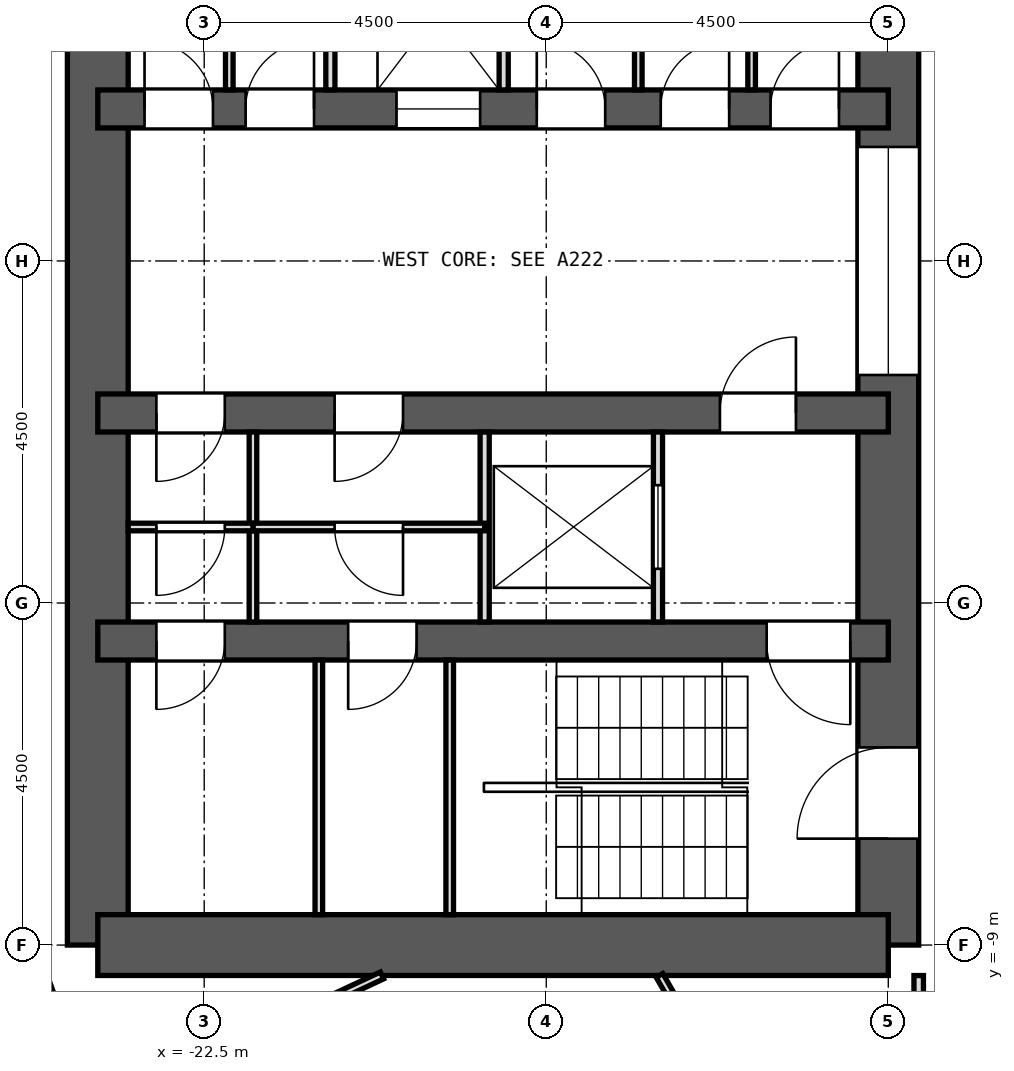
"""IFC4 building model, lengths in metres.
Left out: names, types, materials, properties, quantities, classifications, styles, units other than length and angle.
Written with IfcOpenShell. Run it as: python <this file> out.ifc"""

import sys

from ifc_helpers import new_model, si_unit, direction, frame, frame_2d, origin, place, context, subcontext, project, spatial, rectangle, extrude, element, fill, save


model = new_model("IFC4")
c1 = context("Model", 3, precision=1e-05, world=origin(), true_north=direction((0.0, 1.0)))
c2 = subcontext(c1, "Body", "Model", "MODEL_VIEW")
j1 = project(units=[si_unit("LENGTHUNIT", "METRE"), si_unit("PLANEANGLEUNIT", "RADIAN")], contexts=[c1])
p1 = place(None, origin())
s1 = spatial("IfcSite", under=j1, at=p1, CompositionType="ELEMENT")
p2 = place(p1, origin())
s2 = spatial("IfcBuilding", under=s1, at=p2, CompositionType="ELEMENT")
p3 = place(p2, frame((0.0, 0.0, 141.4)))
s3 = spatial("IfcBuildingStorey", under=s2, at=p3, CompositionType="ELEMENT", Elevation=141.4)
p4 = place(p3, frame((-13.5, -9.0, 0.0), z_axis=(0.0, 0.0, 1.0), x_axis=(0.0, 1.0, 0.0)))
e1 = element("IfcWall", 1, at=p4, inside=s3, PredefinedType="SHEAR", context=c2, shape_type="SweptSolid", body=[
    extrude(rectangle(XDim=18.0, YDim=0.8, at=frame_2d((9.0, 0.0))), origin(), (0.0, 0.0, 1.0), 3.3),
])
p5 = place(p4, frame((15.4, 0.0, 0.0)))
e2 = element("IfcOpeningElement", 2, at=p5, cuts=e1, PredefinedType="OPENING", context=c2, shape_type="SweptSolid", body=[
    extrude(rectangle(XDim=1.2, YDim=2.1, at=frame_2d((0.6, 1.05))), frame((0.0, 0.412, 0.0), z_axis=(0.0, -1.0, 0.0), x_axis=(1.0, 0.0, 0.0)), (0.0, 0.0, 1.0), 0.824),
])
p6 = place(p4, frame((1.4, 0.0, 0.0)))
e3 = element("IfcOpeningElement", 3, at=p6, cuts=e1, PredefinedType="OPENING", context=c2, shape_type="SweptSolid", body=[
    extrude(rectangle(XDim=1.2, YDim=2.1, at=frame_2d((0.6, 1.05))), frame((0.0, 0.412, 0.0), z_axis=(0.0, -1.0, 0.0), x_axis=(1.0, 0.0, 0.0)), (0.0, 0.0, 1.0), 0.824),
])
p7 = place(p4, frame((7.5, 0.0, 0.0)))
e4 = element("IfcOpeningElement", 4, at=p7, cuts=e1, PredefinedType="OPENING", context=c2, shape_type="SweptSolid", body=[
    extrude(rectangle(XDim=3.0, YDim=2.4, at=frame_2d((1.5, 1.2))), frame((0.0, 0.412, 0.0), z_axis=(0.0, -1.0, 0.0), x_axis=(1.0, 0.0, 0.0)), (0.0, 0.0, 1.0), 0.824),
])
p8 = place(p3, frame((-23.9, -9.0, 0.0), z_axis=(0.0, 0.0, 1.0), x_axis=(0.0, 1.0, 0.0)))
e5 = element("IfcWall", 5, at=p8, inside=s3, PredefinedType="SHEAR", context=c2, shape_type="SweptSolid", body=[
    extrude(rectangle(XDim=18.0, YDim=0.8, at=frame_2d((9.0, 0.0))), origin(), (0.0, 0.0, 1.0), 3.3),
])
p9 = place(p3, frame((-13.5, -9.0, 0.0), z_axis=(0.0, 0.0, 1.0), x_axis=(-1.0, 0.0, 0.0)))
e6 = element("IfcWall", 6, at=p9, inside=s3, PredefinedType="SHEAR", context=c2, shape_type="SweptSolid", body=[
    extrude(rectangle(XDim=10.4, YDim=0.8, at=frame_2d((5.2, 0.0))), origin(), (0.0, 0.0, 1.0), 3.3),
])
p10 = place(p3, frame((-13.5, -5.0, 0.0), z_axis=(0.0, 0.0, 1.0), x_axis=(-1.0, 0.0, 0.0)))
e7 = element("IfcWall", 7, at=p10, inside=s3, PredefinedType="SHEAR", context=c2, shape_type="SweptSolid", body=[
    extrude(rectangle(XDim=10.4, YDim=0.5, at=frame_2d((5.2, 0.0))), origin(), (0.0, 0.0, 1.0), 3.3),
])
p11 = place(p10, frame((6.206, 0.0, 0.0)))
e8 = element("IfcOpeningElement", 8, at=p11, cuts=e7, PredefinedType="OPENING", context=c2, shape_type="SweptSolid", body=[
    extrude(rectangle(XDim=0.9, YDim=2.1, at=frame_2d((0.45, 1.05))), frame((0.0, 0.262, 0.0), z_axis=(0.0, -1.0, 0.0), x_axis=(1.0, 0.0, 0.0)), (0.0, 0.0, 1.0), 0.524),
])
p12 = place(p10, frame((8.729, 0.0, 0.0)))
e9 = element("IfcOpeningElement", 9, at=p12, cuts=e7, PredefinedType="OPENING", context=c2, shape_type="SweptSolid", body=[
    extrude(rectangle(XDim=0.9, YDim=2.1, at=frame_2d((0.45, 1.05))), frame((0.0, 0.262, 0.0), z_axis=(0.0, -1.0, 0.0), x_axis=(1.0, 0.0, 0.0)), (0.0, 0.0, 1.0), 0.524),
])
p13 = place(p10, frame((0.5, 0.0, 0.0)))
e10 = element("IfcOpeningElement", 10, at=p13, cuts=e7, PredefinedType="OPENING", context=c2, shape_type="SweptSolid", body=[
    extrude(rectangle(XDim=1.1, YDim=2.1, at=frame_2d((0.55, 1.05))), frame((0.0, 0.262, 0.0), z_axis=(0.0, -1.0, 0.0), x_axis=(1.0, 0.0, 0.0)), (0.0, 0.0, 1.0), 0.524),
])
p14 = place(p3, frame((-13.5, 2.0, 0.0), z_axis=(0.0, 0.0, 1.0), x_axis=(-1.0, 0.0, 0.0)))
e11 = element("IfcWall", 11, at=p14, inside=s3, PredefinedType="SHEAR", context=c2, shape_type="SweptSolid", body=[
    extrude(rectangle(XDim=10.4, YDim=0.5, at=frame_2d((5.2, 0.0))), origin(), (0.0, 0.0, 1.0), 3.3),
])
p15 = place(p14, frame((5.37, 0.0, 0.0)))
e12 = element("IfcOpeningElement", 12, at=p15, cuts=e11, PredefinedType="OPENING", context=c2, shape_type="SweptSolid", body=[
    extrude(rectangle(XDim=1.1, YDim=2.1, at=frame_2d((0.55, 1.05))), frame((0.0, 0.262, 0.0), z_axis=(0.0, -1.0, 0.0), x_axis=(1.0, 0.0, 0.0)), (0.0, 0.0, 1.0), 0.524),
])
p16 = place(p14, frame((0.649, 0.0, 0.0)))
e13 = element("IfcOpeningElement", 13, at=p16, cuts=e11, PredefinedType="OPENING", context=c2, shape_type="SweptSolid", body=[
    extrude(rectangle(XDim=0.9, YDim=2.1, at=frame_2d((0.45, 1.05))), frame((0.0, 0.262, 0.0), z_axis=(0.0, -1.0, 0.0), x_axis=(1.0, 0.0, 0.0)), (0.0, 0.0, 1.0), 0.524),
])
p17 = place(p14, frame((2.094, 0.0, 0.0)))
e14 = element("IfcOpeningElement", 14, at=p17, cuts=e11, PredefinedType="OPENING", context=c2, shape_type="SweptSolid", body=[
    extrude(rectangle(XDim=0.9, YDim=2.1, at=frame_2d((0.45, 1.05))), frame((0.0, 0.262, 0.0), z_axis=(0.0, -1.0, 0.0), x_axis=(1.0, 0.0, 0.0)), (0.0, 0.0, 1.0), 0.524),
])
p18 = place(p14, frame((3.725, 0.0, 0.0)))
e15 = element("IfcOpeningElement", 15, at=p18, cuts=e11, PredefinedType="OPENING", context=c2, shape_type="SweptSolid", body=[
    extrude(rectangle(XDim=0.9, YDim=2.1, at=frame_2d((0.45, 1.05))), frame((0.0, 0.262, 0.0), z_axis=(0.0, -1.0, 0.0), x_axis=(1.0, 0.0, 0.0)), (0.0, 0.0, 1.0), 0.524),
])
p19 = place(p14, frame((7.555, 0.0, 0.0)))
e16 = element("IfcOpeningElement", 16, at=p19, cuts=e11, PredefinedType="OPENING", context=c2, shape_type="SweptSolid", body=[
    extrude(rectangle(XDim=0.9, YDim=2.1, at=frame_2d((0.45, 1.05))), frame((0.0, 0.262, 0.0), z_axis=(0.0, -1.0, 0.0), x_axis=(1.0, 0.0, 0.0)), (0.0, 0.0, 1.0), 0.524),
])
p20 = place(p14, frame((8.885, 0.0, 0.0)))
e17 = element("IfcOpeningElement", 17, at=p20, cuts=e11, PredefinedType="OPENING", context=c2, shape_type="SweptSolid", body=[
    extrude(rectangle(XDim=0.9, YDim=2.1, at=frame_2d((0.45, 1.05))), frame((0.0, 0.262, 0.0), z_axis=(0.0, -1.0, 0.0), x_axis=(1.0, 0.0, 0.0)), (0.0, 0.0, 1.0), 0.524),
])
p21 = place(p3, frame((-13.5, -2.0, 0.0), z_axis=(0.0, 0.0, 1.0), x_axis=(-1.0, 0.0, 0.0)))
e18 = element("IfcWall", 18, at=p21, inside=s3, PredefinedType="SHEAR", context=c2, shape_type="SweptSolid", body=[
    extrude(rectangle(XDim=10.4, YDim=0.5, at=frame_2d((5.2, 0.0))), origin(), (0.0, 0.0, 1.0), 3.3),
])
p22 = place(p21, frame((1.215, 0.0, 0.0)))
e19 = element("IfcOpeningElement", 19, at=p22, cuts=e18, PredefinedType="OPENING", context=c2, shape_type="SweptSolid", body=[
    extrude(rectangle(XDim=1.0, YDim=2.1, at=frame_2d((0.5, 1.05))), frame((0.0, 0.262, 0.0), z_axis=(0.0, -1.0, 0.0), x_axis=(1.0, 0.0, 0.0)), (0.0, 0.0, 1.0), 0.524),
])
p23 = place(p21, frame((6.384, 0.0, 0.0)))
e20 = element("IfcOpeningElement", 20, at=p23, cuts=e18, PredefinedType="OPENING", context=c2, shape_type="SweptSolid", body=[
    extrude(rectangle(XDim=0.9, YDim=2.1, at=frame_2d((0.45, 1.05))), frame((0.0, 0.262, 0.0), z_axis=(0.0, -1.0, 0.0), x_axis=(1.0, 0.0, 0.0)), (0.0, 0.0, 1.0), 0.524),
])
p24 = place(p21, frame((8.729, 0.0, 0.0)))
e21 = element("IfcOpeningElement", 21, at=p24, cuts=e18, PredefinedType="OPENING", context=c2, shape_type="SweptSolid", body=[
    extrude(rectangle(XDim=0.9, YDim=2.1, at=frame_2d((0.45, 1.05))), frame((0.0, 0.262, 0.0), z_axis=(0.0, -1.0, 0.0), x_axis=(1.0, 0.0, 0.0)), (0.0, 0.0, 1.0), 0.524),
])
p25 = place(p3, frame((-25.617, -7.383, 0.0), z_axis=(0.0, 0.0, 1.0), x_axis=(0.341990236633, -0.939703505393, 0.0)))
e22 = element("IfcWall", 22, at=p25, inside=s3, PredefinedType="SOLIDWALL", context=c2, shape_type="SweptSolid", body=[
    extrude(rectangle(XDim=3.648, YDim=0.6, at=frame_2d((1.824, 0.0))), origin(), (0.0, 0.0, 1.0), 2.8),
])
p26 = place(p3, frame((-16.51, -9.4, 0.0), z_axis=(0.0, 0.0, 1.0), x_axis=(0.499745582535, -0.866172241957, 0.0)))
e23 = element("IfcWall", 23, at=p26, inside=s3, PredefinedType="PARTITIONING", context=c2, shape_type="SweptSolid", body=[
    extrude(rectangle(XDim=1.828, YDim=0.1, at=frame_2d((0.914, 0.0))), origin(), (0.0, 0.0, 1.0), 2.8),
])
p27 = place(p26, frame((0.763, 0.0, 0.0)))
e24 = element("IfcOpeningElement", 24, at=p27, cuts=e23, PredefinedType="OPENING", context=c2, shape_type="SweptSolid", body=[
    extrude(rectangle(XDim=0.85, YDim=2.1, at=frame_2d((0.425, 1.05))), frame((0.0, 0.062, 0.0), z_axis=(0.0, -1.0, 0.0), x_axis=(1.0, 0.0, 0.0)), (0.0, 0.0, 1.0), 0.124),
])
p28 = place(p3, frame((-23.26, -10.847, 0.0), z_axis=(0.0, 0.0, 1.0), x_axis=(0.906042683175, 0.423186313892, 0.0)))
e25 = element("IfcWall", 25, at=p28, inside=s3, PredefinedType="PARTITIONING", context=c2, shape_type="SweptSolid", body=[
    extrude(rectangle(XDim=3.42, YDim=0.1, at=frame_2d((1.71, 0.0))), origin(), (0.0, 0.0, 1.0), 2.8),
])
p29 = place(p3, frame((-13.097, -13.096, 0.0), z_axis=(0.0, 0.0, 1.0), x_axis=(0.707375421738, 0.706838038536, 0.0)))
e26 = element("IfcWall", 26, at=p29, inside=s3, PredefinedType="PARTITIONING", context=c2, shape_type="SweptSolid", body=[
    extrude(rectangle(XDim=6.815, YDim=0.125, at=frame_2d((3.407, 0.0))), origin(), (0.0, 0.0, 1.0), 2.8),
])
p30 = place(p3, frame((-13.1, -13.032, 0.0), z_axis=(0.0, 0.0, 1.0), x_axis=(0.0, 1.0, 0.0)))
e27 = element("IfcWall", 27, at=p30, inside=s3, PredefinedType="PARTITIONING", context=c2, shape_type="SweptSolid", body=[
    extrude(rectangle(XDim=3.632, YDim=0.125, at=frame_2d((1.816, 0.0))), origin(), (0.0, 0.0, 1.0), 2.8),
])
for number, where, z_axis, x_axis in (
    (28, (-15.298, 2.25, 0.0), (0.0, 0.0, 1.0), (0.0, 1.0, 0.0)),
    (29, (-16.789, 2.25, 0.0), (0.0, 0.0, 1.0), (0.0, 1.0, 0.0)),
):
    element("IfcWall", number, at=place(p3, frame(where, z_axis=z_axis, x_axis=x_axis)), inside=s3, PredefinedType="PARTITIONING", context=c2, shape_type="SweptSolid", body=[
        extrude(rectangle(XDim=2.5, YDim=0.1, at=frame_2d((1.25, 0.0))), origin(), (0.0, 0.0, 1.0), 2.8),
    ])
for number, where, z_axis, x_axis in (
    (30, (-18.56, 2.25, 0.0), (0.0, 0.0, 1.0), (0.0, 1.0, 0.0)),
    (31, (-20.84, 2.25, 0.0), (0.0, 0.0, 1.0), (0.0, 1.0, 0.0)),
):
    element("IfcWall", number, at=place(p3, frame(where, z_axis=z_axis, x_axis=x_axis)), inside=s3, PredefinedType="PARTITIONING", context=c2, shape_type="SweptSolid", body=[
        extrude(rectangle(XDim=2.5, YDim=0.12, at=frame_2d((1.25, 0.0))), origin(), (0.0, 0.0, 1.0), 2.8),
    ])
p31 = place(p3, frame((-22.17, 2.25, 0.0), z_axis=(0.0, 0.0, 1.0), x_axis=(0.0, 1.0, 0.0)))
e32 = element("IfcWall", 32, at=p31, inside=s3, PredefinedType="PARTITIONING", context=c2, shape_type="SweptSolid", body=[
    extrude(rectangle(XDim=2.5, YDim=0.1, at=frame_2d((1.25, 0.0))), origin(), (0.0, 0.0, 1.0), 2.8),
])
p32 = place(p3, frame((-16.53, -4.75, 0.0), z_axis=(0.0, 0.0, 1.0), x_axis=(0.0, 1.0, 0.0)))
e33 = element("IfcWall", 33, at=p32, inside=s3, PredefinedType="PARTITIONING", context=c2, shape_type="SweptSolid", body=[
    extrude(rectangle(XDim=2.5, YDim=0.12, at=frame_2d((1.25, 0.0))), origin(), (0.0, 0.0, 1.0), 2.8),
])
p33 = place(p32, frame((0.7, 0.0, 0.0)))
e34 = element("IfcOpeningElement", 34, at=p33, cuts=e33, PredefinedType="OPENING", context=c2, shape_type="SweptSolid", body=[
    extrude(rectangle(XDim=1.1, YDim=2.1, at=frame_2d((0.55, 1.05))), frame((0.0, 0.072, 0.0), z_axis=(0.0, -1.0, 0.0), x_axis=(1.0, 0.0, 0.0)), (0.0, 0.0, 1.0), 0.144),
])
p34 = place(p3, frame((-18.81, -4.75, 0.0), z_axis=(0.0, 0.0, 1.0), x_axis=(0.0, 1.0, 0.0)))
e35 = element("IfcWall", 35, at=p34, inside=s3, PredefinedType="PARTITIONING", context=c2, shape_type="SweptSolid", body=[
    extrude(rectangle(XDim=2.5, YDim=0.12, at=frame_2d((1.25, 0.0))), origin(), (0.0, 0.0, 1.0), 2.8),
])
p35 = place(p3, frame((-21.858, -4.75, 0.0), z_axis=(0.0, 0.0, 1.0), x_axis=(0.0, 1.0, 0.0)))
e36 = element("IfcWall", 36, at=p35, inside=s3, PredefinedType="PARTITIONING", context=c2, shape_type="SweptSolid", body=[
    extrude(rectangle(XDim=2.5, YDim=0.1, at=frame_2d((1.25, 0.0))), origin(), (0.0, 0.0, 1.0), 2.8),
])
p36 = place(p3, frame((-18.81, -3.5, 0.0), z_axis=(0.0, 0.0, 1.0), x_axis=(-1.0, 0.0, 0.0)))
e37 = element("IfcWall", 37, at=p36, inside=s3, PredefinedType="PARTITIONING", context=c2, shape_type="SweptSolid", body=[
    extrude(rectangle(XDim=3.048, YDim=0.1, at=frame_2d((1.524, 0.0))), origin(), (0.0, 0.0, 1.0), 2.8),
])
p37 = place(p36, frame((1.074, 0.0, 0.0)))
e38 = element("IfcOpeningElement", 38, at=p37, cuts=e37, PredefinedType="OPENING", context=c2, shape_type="SweptSolid", body=[
    extrude(rectangle(XDim=0.9, YDim=2.1, at=frame_2d((0.45, 1.05))), frame((0.0, 0.062, 0.0), z_axis=(0.0, -1.0, 0.0), x_axis=(1.0, 0.0, 0.0)), (0.0, 0.0, 1.0), 0.124),
])
p38 = place(p3, frame((-21.858, -3.5, 0.0), z_axis=(0.0, 0.0, 1.0), x_axis=(-1.0, 0.0, 0.0)))
e39 = element("IfcWall", 39, at=p38, inside=s3, PredefinedType="PARTITIONING", context=c2, shape_type="SweptSolid", body=[
    extrude(rectangle(XDim=1.642, YDim=0.1, at=frame_2d((0.821, 0.0))), origin(), (0.0, 0.0, 1.0), 2.8),
])
p39 = place(p38, frame((0.371, 0.0, 0.0)))
e40 = element("IfcOpeningElement", 40, at=p39, cuts=e39, PredefinedType="OPENING", context=c2, shape_type="SweptSolid", body=[
    extrude(rectangle(XDim=0.9, YDim=2.1, at=frame_2d((0.45, 1.05))), frame((0.0, 0.062, 0.0), z_axis=(0.0, -1.0, 0.0), x_axis=(1.0, 0.0, 0.0)), (0.0, 0.0, 1.0), 0.124),
])
for number, where, z_axis, x_axis in (
    (41, (-19.27, -8.6, 0.0), (0.0, 0.0, 1.0), (0.0, 1.0, 0.0)),
    (42, (-20.992, -8.6, 0.0), (0.0, 0.0, 1.0), (0.0, 1.0, 0.0)),
):
    element("IfcWall", number, at=place(p3, frame(where, z_axis=z_axis, x_axis=x_axis)), inside=s3, PredefinedType="PARTITIONING", context=c2, shape_type="SweptSolid", body=[
        extrude(rectangle(XDim=3.35, YDim=0.1, at=frame_2d((1.675, 0.0))), origin(), (0.0, 0.0, 1.0), 2.8),
    ])
p40 = place(p15, origin())
e43 = element("IfcDoor", 43, at=p40, inside=s3, OperationType="DOUBLE_DOOR_SLIDING", PredefinedType="DOOR", context=c2, shape_type="SweptSolid", body=[
    extrude(rectangle(XDim=1.1, YDim=2.1, at=frame_2d((0.55, 1.05))), frame((0.0, 0.025, 0.0), z_axis=(0.0, -1.0, 0.0), x_axis=(1.0, 0.0, 0.0)), (0.0, 0.0, 1.0), 0.05),
])
fill(e12, e43)
p41 = place(p33, origin())
e44 = element("IfcDoor", 44, at=p41, inside=s3, OperationType="DOUBLE_DOOR_SLIDING", PredefinedType="DOOR", context=c2, shape_type="SweptSolid", body=[
    extrude(rectangle(XDim=1.1, YDim=2.1, at=frame_2d((0.55, 1.05))), frame((0.0, 0.025, 0.0), z_axis=(0.0, -1.0, 0.0), x_axis=(1.0, 0.0, 0.0)), (0.0, 0.0, 1.0), 0.05),
])
fill(e34, e44)
p42 = place(p16, frame((0.9, 0.0, 0.0), z_axis=(0.0, 0.0, 1.0), x_axis=(-1.0, 0.0, 0.0)))
e45 = element("IfcDoor", 45, at=p42, inside=s3, OperationType="SINGLE_SWING_RIGHT", PredefinedType="DOOR", context=c2, shape_type="SweptSolid", body=[
    extrude(rectangle(XDim=0.9, YDim=2.1, at=frame_2d((0.45, 1.05))), frame((0.0, 0.025, 0.0), z_axis=(0.0, -1.0, 0.0), x_axis=(1.0, 0.0, 0.0)), (0.0, 0.0, 1.0), 0.05),
])
fill(e13, e45)
p43 = place(p17, frame((0.9, 0.0, 0.0), z_axis=(0.0, 0.0, 1.0), x_axis=(-1.0, 0.0, 0.0)))
e46 = element("IfcDoor", 46, at=p43, inside=s3, OperationType="SINGLE_SWING_RIGHT", PredefinedType="DOOR", context=c2, shape_type="SweptSolid", body=[
    extrude(rectangle(XDim=0.9, YDim=2.1, at=frame_2d((0.45, 1.05))), frame((0.0, 0.025, 0.0), z_axis=(0.0, -1.0, 0.0), x_axis=(1.0, 0.0, 0.0)), (0.0, 0.0, 1.0), 0.05),
])
fill(e14, e46)
p44 = place(p18, frame((0.9, 0.0, 0.0), z_axis=(0.0, 0.0, 1.0), x_axis=(-1.0, 0.0, 0.0)))
e47 = element("IfcDoor", 47, at=p44, inside=s3, OperationType="SINGLE_SWING_LEFT", PredefinedType="DOOR", context=c2, shape_type="SweptSolid", body=[
    extrude(rectangle(XDim=0.9, YDim=2.1, at=frame_2d((0.45, 1.05))), frame((0.0, 0.025, 0.0), z_axis=(0.0, -1.0, 0.0), x_axis=(1.0, 0.0, 0.0)), (0.0, 0.0, 1.0), 0.05),
])
fill(e15, e47)
p45 = place(p19, frame((0.9, 0.0, 0.0), z_axis=(0.0, 0.0, 1.0), x_axis=(-1.0, 0.0, 0.0)))
e48 = element("IfcDoor", 48, at=p45, inside=s3, OperationType="SINGLE_SWING_RIGHT", PredefinedType="DOOR", context=c2, shape_type="SweptSolid", body=[
    extrude(rectangle(XDim=0.9, YDim=2.1, at=frame_2d((0.45, 1.05))), frame((0.0, 0.025, 0.0), z_axis=(0.0, -1.0, 0.0), x_axis=(1.0, 0.0, 0.0)), (0.0, 0.0, 1.0), 0.05),
])
fill(e16, e48)
p46 = place(p20, frame((0.9, 0.0, 0.0), z_axis=(0.0, 0.0, 1.0), x_axis=(-1.0, 0.0, 0.0)))
e49 = element("IfcDoor", 49, at=p46, inside=s3, OperationType="SINGLE_SWING_LEFT", PredefinedType="DOOR", context=c2, shape_type="SweptSolid", body=[
    extrude(rectangle(XDim=0.9, YDim=2.1, at=frame_2d((0.45, 1.05))), frame((0.0, 0.025, 0.0), z_axis=(0.0, -1.0, 0.0), x_axis=(1.0, 0.0, 0.0)), (0.0, 0.0, 1.0), 0.05),
])
fill(e17, e49)
p47 = place(p22, frame((1.0, 0.0, 0.0), z_axis=(0.0, 0.0, 1.0), x_axis=(-1.0, 0.0, 0.0)))
e50 = element("IfcDoor", 50, at=p47, inside=s3, OperationType="SINGLE_SWING_RIGHT", PredefinedType="DOOR", context=c2, shape_type="SweptSolid", body=[
    extrude(rectangle(XDim=1.0, YDim=2.1, at=frame_2d((0.5, 1.05))), frame((0.0, 0.025, 0.0), z_axis=(0.0, -1.0, 0.0), x_axis=(1.0, 0.0, 0.0)), (0.0, 0.0, 1.0), 0.05),
])
fill(e19, e50)
p48 = place(p23, origin())
e51 = element("IfcDoor", 51, at=p48, inside=s3, OperationType="SINGLE_SWING_RIGHT", PredefinedType="DOOR", context=c2, shape_type="SweptSolid", body=[
    extrude(rectangle(XDim=0.9, YDim=2.1, at=frame_2d((0.45, 1.05))), frame((0.0, 0.025, 0.0), z_axis=(0.0, -1.0, 0.0), x_axis=(1.0, 0.0, 0.0)), (0.0, 0.0, 1.0), 0.05),
])
fill(e20, e51)
p49 = place(p24, origin())
e52 = element("IfcDoor", 52, at=p49, inside=s3, OperationType="SINGLE_SWING_RIGHT", PredefinedType="DOOR", context=c2, shape_type="SweptSolid", body=[
    extrude(rectangle(XDim=0.9, YDim=2.1, at=frame_2d((0.45, 1.05))), frame((0.0, 0.025, 0.0), z_axis=(0.0, -1.0, 0.0), x_axis=(1.0, 0.0, 0.0)), (0.0, 0.0, 1.0), 0.05),
])
fill(e21, e52)
p50 = place(p39, origin())
e53 = element("IfcDoor", 53, at=p50, inside=s3, OperationType="SINGLE_SWING_RIGHT", PredefinedType="DOOR", context=c2, shape_type="SweptSolid", body=[
    extrude(rectangle(XDim=0.9, YDim=2.1, at=frame_2d((0.45, 1.05))), frame((0.0, 0.025, 0.0), z_axis=(0.0, -1.0, 0.0), x_axis=(1.0, 0.0, 0.0)), (0.0, 0.0, 1.0), 0.05),
])
fill(e40, e53)
p51 = place(p37, origin())
e54 = element("IfcDoor", 54, at=p51, inside=s3, OperationType="SINGLE_SWING_LEFT", PredefinedType="DOOR", context=c2, shape_type="SweptSolid", body=[
    extrude(rectangle(XDim=0.9, YDim=2.1, at=frame_2d((0.45, 1.05))), frame((0.0, 0.025, 0.0), z_axis=(0.0, -1.0, 0.0), x_axis=(1.0, 0.0, 0.0)), (0.0, 0.0, 1.0), 0.05),
])
fill(e38, e54)
p52 = place(p11, origin())
e55 = element("IfcDoor", 55, at=p52, inside=s3, OperationType="SINGLE_SWING_RIGHT", PredefinedType="DOOR", context=c2, shape_type="SweptSolid", body=[
    extrude(rectangle(XDim=0.9, YDim=2.1, at=frame_2d((0.45, 1.05))), frame((0.0, 0.025, 0.0), z_axis=(0.0, -1.0, 0.0), x_axis=(1.0, 0.0, 0.0)), (0.0, 0.0, 1.0), 0.05),
])
fill(e8, e55)
p53 = place(p12, origin())
e56 = element("IfcDoor", 56, at=p53, inside=s3, OperationType="SINGLE_SWING_RIGHT", PredefinedType="DOOR", context=c2, shape_type="SweptSolid", body=[
    extrude(rectangle(XDim=0.9, YDim=2.1, at=frame_2d((0.45, 1.05))), frame((0.0, 0.025, 0.0), z_axis=(0.0, -1.0, 0.0), x_axis=(1.0, 0.0, 0.0)), (0.0, 0.0, 1.0), 0.05),
])
fill(e9, e56)
p54 = place(p13, origin())
e57 = element("IfcDoor", 57, at=p54, inside=s3, OperationType="SINGLE_SWING_LEFT", PredefinedType="DOOR", context=c2, shape_type="SweptSolid", body=[
    extrude(rectangle(XDim=1.1, YDim=2.1, at=frame_2d((0.55, 1.05))), frame((0.0, 0.025, 0.0), z_axis=(0.0, -1.0, 0.0), x_axis=(1.0, 0.0, 0.0)), (0.0, 0.0, 1.0), 0.05),
])
fill(e10, e57)
p55 = place(p6, origin())
e58 = element("IfcDoor", 58, at=p55, inside=s3, OperationType="SINGLE_SWING_LEFT", PredefinedType="DOOR", context=c2, shape_type="SweptSolid", body=[
    extrude(rectangle(XDim=1.2, YDim=2.1, at=frame_2d((0.6, 1.05))), frame((0.0, 0.025, 0.0), z_axis=(0.0, -1.0, 0.0), x_axis=(1.0, 0.0, 0.0)), (0.0, 0.0, 1.0), 0.05),
])
fill(e3, e58)
p56 = place(p7, origin())
e59 = element("IfcDoor", 59, at=p56, inside=s3, OperationType="DOUBLE_DOOR_SLIDING", PredefinedType="DOOR", context=c2, shape_type="SweptSolid", body=[
    extrude(rectangle(XDim=3.0, YDim=2.4, at=frame_2d((1.5, 1.2))), frame((0.0, 0.025, 0.0), z_axis=(0.0, -1.0, 0.0), x_axis=(1.0, 0.0, 0.0)), (0.0, 0.0, 1.0), 0.05),
])
fill(e4, e59)
save(model, sys.argv[1])
